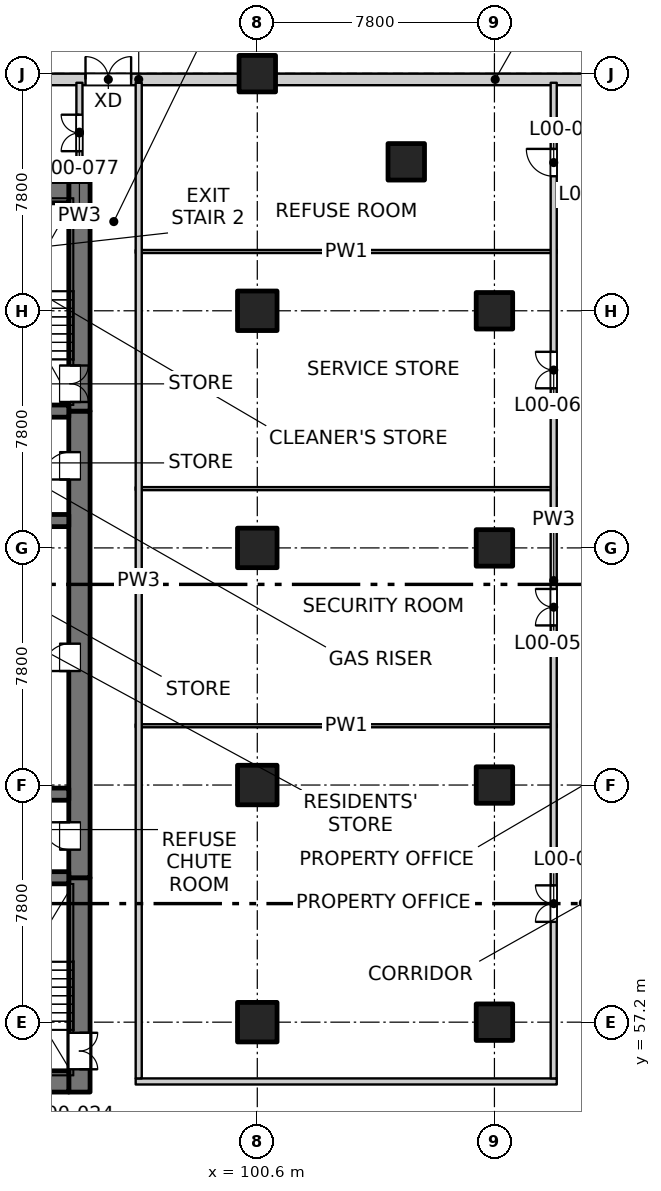
"""IFC4 building model, lengths in metres.
Left out: names, types, materials, properties, quantities, classifications, styles, units other than length and angle.
Written with IfcOpenShell. Run it as: python <this file> out.ifc"""

import sys

from ifc_helpers import new_model, si_unit, direction, frame, frame_2d, origin, origin_2d, place, context, subcontext, project, spatial, rectangle, extrude, element, fill, save


model = new_model("IFC4")
c1 = context("Model", 3, precision=1e-05, world=origin(), true_north=direction((0.0, 1.0)))
c2 = subcontext(c1, "Body", "Model", "MODEL_VIEW")
j1 = project(units=[si_unit("LENGTHUNIT", "METRE"), si_unit("PLANEANGLEUNIT", "RADIAN")], contexts=[c1])
p1 = place(None, origin())
s1 = spatial("IfcSite", under=j1, at=p1, CompositionType="ELEMENT")
p2 = place(p1, origin())
s2 = spatial("IfcBuilding", under=s1, at=p2, CompositionType="ELEMENT")
p3 = place(p2, origin())
s3 = spatial("IfcBuildingStorey", under=s2, at=p3, CompositionType="ELEMENT", Elevation=0.0)
for number, where, z_axis, x_axis in (
    (1, (105.5, 85.5, -0.4), (0.0, 0.0, 1.0), (1.0, 0.0, 0.0)),
    (2, (108.4, 57.2, -0.4), (0.0, 0.0, 1.0), (1.0, 0.0, 0.0)),
    (3, (108.4, 65.0, -0.4), (0.0, 0.0, 1.0), (1.0, 0.0, 0.0)),
    (4, (108.4, 72.8, -0.4), (0.0, 0.0, 1.0), (1.0, 0.0, 0.0)),
    (5, (108.4, 80.6, -0.4), (0.0, 0.0, 1.0), (1.0, 0.0, 0.0)),
    (6, (100.6, 88.4, -0.4), (0.0, 0.0, 1.0), (1.0, 0.0, 0.0)),
):
    element("IfcColumn", number, at=place(p3, frame(where, z_axis=z_axis, x_axis=x_axis)), inside=s3, PredefinedType="COLUMN", context=c2, shape_type="SweptSolid", body=[
        extrude(rectangle(XDim=1.2, YDim=1.2, at=origin_2d()), origin(), (0.0, 0.0, 1.0), 6.1),
    ])
for number, where, z_axis, x_axis in (
    (7, (100.6, 57.2, -0.4), (0.0, 0.0, 1.0), (1.0, 0.0, 0.0)),
    (8, (100.6, 65.0, -0.4), (0.0, 0.0, 1.0), (1.0, 0.0, 0.0)),
    (9, (100.6, 72.8, -0.4), (0.0, 0.0, 1.0), (1.0, 0.0, 0.0)),
    (10, (100.6, 80.6, -0.4), (0.0, 0.0, 1.0), (1.0, 0.0, 0.0)),
):
    element("IfcColumn", number, at=place(p3, frame(where, z_axis=z_axis, x_axis=x_axis)), inside=s3, PredefinedType="COLUMN", context=c2, shape_type="SweptSolid", body=[
        extrude(rectangle(XDim=1.3, YDim=1.3, at=origin_2d()), origin(), (0.0, 0.0, 1.0), 6.1),
    ])
p4 = place(p3, frame((94.75, 54.9, -0.4), z_axis=(0.0, 0.0, 1.0), x_axis=(0.0, 1.0, 0.0)))
e11 = element("IfcWall", 11, at=p4, inside=s3, PredefinedType="SOLIDWALL", context=c2, shape_type="SweptSolid", body=[
    extrude(rectangle(XDim=7.05, YDim=0.7, at=frame_2d((3.525, 0.0))), origin(), (0.0, 0.0, 1.0), 6.1),
])
p5 = place(p4, frame((0.75, 0.0, 0.4)))
e12 = element("IfcOpeningElement", 12, at=p5, cuts=e11, PredefinedType="OPENING", context=c2, shape_type="SweptSolid", body=[
    extrude(rectangle(XDim=1.2, YDim=2.1, at=frame_2d((0.6, 1.05))), frame((0.0, 0.36, 0.0), z_axis=(0.0, -1.0, 0.0), x_axis=(1.0, 0.0, 0.0)), (0.0, 0.0, 1.0), 0.72),
])
p6 = place(p3, frame((94.75, 61.95, -0.4), z_axis=(0.0, 0.0, 1.0), x_axis=(0.0, 1.0, 0.0)))
e13 = element("IfcWall", 13, at=p6, inside=s3, PredefinedType="SOLIDWALL", context=c2, shape_type="SweptSolid", body=[
    extrude(rectangle(XDim=15.35, YDim=0.7, at=frame_2d((7.675, 0.0))), origin(), (0.0, 0.0, 1.0), 6.1),
])
p7 = place(p6, frame((0.925, 0.0, 0.4)))
e14 = element("IfcOpeningElement", 14, at=p7, cuts=e13, PredefinedType="OPENING", context=c2, shape_type="SweptSolid", body=[
    extrude(rectangle(XDim=0.9, YDim=2.1, at=frame_2d((0.45, 1.05))), frame((0.0, 0.36, 0.0), z_axis=(0.0, -1.0, 0.0), x_axis=(1.0, 0.0, 0.0)), (0.0, 0.0, 1.0), 0.72),
])
p8 = place(p6, frame((6.8, 0.0, 0.4)))
e15 = element("IfcOpeningElement", 15, at=p8, cuts=e13, PredefinedType="OPENING", context=c2, shape_type="SweptSolid", body=[
    extrude(rectangle(XDim=0.9, YDim=2.1, at=frame_2d((0.45, 1.05))), frame((0.0, 0.36, 0.0), z_axis=(0.0, -1.0, 0.0), x_axis=(1.0, 0.0, 0.0)), (0.0, 0.0, 1.0), 0.72),
])
p9 = place(p6, frame((13.1, 0.0, 0.4)))
e16 = element("IfcOpeningElement", 16, at=p9, cuts=e13, PredefinedType="OPENING", context=c2, shape_type="SweptSolid", body=[
    extrude(rectangle(XDim=0.9, YDim=2.1, at=frame_2d((0.45, 1.05))), frame((0.0, 0.36, 0.0), z_axis=(0.0, -1.0, 0.0), x_axis=(1.0, 0.0, 0.0)), (0.0, 0.0, 1.0), 0.72),
])
p10 = place(p3, frame((94.75, 77.3, -0.4), z_axis=(0.0, 0.0, 1.0), x_axis=(0.0, 1.0, 0.0)))
e17 = element("IfcWall", 17, at=p10, inside=s3, PredefinedType="SOLIDWALL", context=c2, shape_type="SweptSolid", body=[
    extrude(rectangle(XDim=7.55, YDim=0.7, at=frame_2d((3.775, 0.0))), origin(), (0.0, 0.0, 1.0), 6.1),
])
p11 = place(p10, frame((0.3, 0.0, 0.4)))
e18 = element("IfcOpeningElement", 18, at=p11, cuts=e17, PredefinedType="OPENING", context=c2, shape_type="SweptSolid", body=[
    extrude(rectangle(XDim=1.2, YDim=2.1, at=frame_2d((0.6, 1.05))), frame((0.0, 0.36, 0.0), z_axis=(0.0, -1.0, 0.0), x_axis=(1.0, 0.0, 0.0)), (0.0, 0.0, 1.0), 0.72),
])
p12 = place(p3, frame((75.6, 55.25, -0.4), z_axis=(0.0, 0.0, 1.0), x_axis=(1.0, 0.0, 0.0)))
e19 = element("IfcWall", 19, at=p12, inside=s3, PredefinedType="SOLIDWALL", context=c2, shape_type="SweptSolid", body=[
    extrude(rectangle(XDim=18.8, YDim=0.7, at=frame_2d((9.4, 0.0))), origin(), (0.0, 0.0, 1.0), 6.1),
])
p13 = place(p12, frame((8.65, 0.0, 0.4)))
e20 = element("IfcOpeningElement", 20, at=p13, cuts=e19, PredefinedType="OPENING", context=c2, shape_type="SweptSolid", body=[
    extrude(rectangle(XDim=1.5, YDim=2.1, at=frame_2d((0.75, 1.05))), frame((0.0, 0.36, 0.0), z_axis=(0.0, -1.0, 0.0), x_axis=(1.0, 0.0, 0.0)), (0.0, 0.0, 1.0), 0.72),
])
p14 = place(p3, frame((75.6, 84.5, -0.4), z_axis=(0.0, 0.0, 1.0), x_axis=(1.0, 0.0, 0.0)))
e21 = element("IfcWall", 21, at=p14, inside=s3, PredefinedType="SOLIDWALL", context=c2, shape_type="SweptSolid", body=[
    extrude(rectangle(XDim=18.8, YDim=0.7, at=frame_2d((9.4, 0.0))), origin(), (0.0, 0.0, 1.0), 6.1),
])
for number, where, z_axis, x_axis in (
    (22, (90.75, 61.95, -0.4), (0.0, 0.0, 1.0), (1.0, 0.0, 0.0)),
    (23, (90.75, 64.7, -0.4), (0.0, 0.0, 1.0), (1.0, 0.0, 0.0)),
    (24, (90.75, 73.7, -0.4), (0.0, 0.0, 1.0), (1.0, 0.0, 0.0)),
    (25, (90.75, 77.3, -0.4), (0.0, 0.0, 1.0), (1.0, 0.0, 0.0)),
):
    element("IfcWall", number, at=place(p3, frame(where, z_axis=z_axis, x_axis=x_axis)), inside=s3, PredefinedType="SOLIDWALL", context=c2, shape_type="SweptSolid", body=[
        extrude(rectangle(XDim=3.65, YDim=0.4, at=frame_2d((1.825, 0.0))), origin(), (0.0, 0.0, 1.0), 6.1),
    ])
p15 = place(p3, frame((93.4, 88.21, 0.0), z_axis=(0.0, 0.0, 1.0), x_axis=(1.0, 0.0, 0.0)))
e26 = element("IfcWall", 26, at=p15, inside=s3, PredefinedType="SOLIDWALL", context=c2, shape_type="SweptSolid", body=[
    extrude(rectangle(XDim=6.6, YDim=0.38, at=frame_2d((3.3, 0.0))), origin(), (0.0, 0.0, 1.0), 5.7),
])
p16 = place(p15, frame((1.55, 0.0, 0.0)))
e27 = element("IfcOpeningElement", 27, at=p16, cuts=e26, PredefinedType="OPENING", context=c2, shape_type="SweptSolid", body=[
    extrude(rectangle(XDim=1.5, YDim=2.4, at=frame_2d((0.75, 1.2))), frame((0.0, 0.2, 0.0), z_axis=(0.0, -1.0, 0.0), x_axis=(1.0, 0.0, 0.0)), (0.0, 0.0, 1.0), 0.4),
])
p17 = place(p3, frame((101.2, 88.21, 0.0), z_axis=(0.0, 0.0, 1.0), x_axis=(1.0, 0.0, 0.0)))
e28 = element("IfcWall", 28, at=p17, inside=s3, PredefinedType="SOLIDWALL", context=c2, shape_type="SweptSolid", body=[
    extrude(rectangle(XDim=14.45, YDim=0.38, at=frame_2d((7.225, 0.0))), origin(), (0.0, 0.0, 1.0), 5.7),
])
p18 = place(p3, frame((96.6, 55.25, 0.0), z_axis=(0.0, 0.0, 1.0), x_axis=(1.0, 0.0, 0.0)))
e29 = element("IfcWall", 29, at=p18, inside=s3, PredefinedType="PARTITIONING", context=c2, shape_type="SweptSolid", body=[
    extrude(rectangle(XDim=13.85, YDim=0.2, at=frame_2d((6.925, 0.0))), origin(), (0.0, 0.0, 1.0), 5.7),
])
for number, where, z_axis, x_axis in (
    (30, (96.6, 66.95, 0.0), (0.0, 0.0, 1.0), (1.0, 0.0, 0.0)),
    (31, (96.6, 74.75, 0.0), (0.0, 0.0, 1.0), (1.0, 0.0, 0.0)),
    (32, (96.6, 82.55, 0.0), (0.0, 0.0, 1.0), (1.0, 0.0, 0.0)),
):
    element("IfcWall", number, at=place(p3, frame(where, z_axis=z_axis, x_axis=x_axis)), inside=s3, PredefinedType="PARTITIONING", context=c2, shape_type="SweptSolid", body=[
        extrude(rectangle(XDim=13.85, YDim=0.1, at=frame_2d((6.925, 0.0))), origin(), (0.0, 0.0, 1.0), 5.7),
    ])
p19 = place(p3, frame((94.75, 84.85, 0.0), z_axis=(0.0, 0.0, 1.0), x_axis=(0.0, 1.0, 0.0)))
e33 = element("IfcWall", 33, at=p19, inside=s3, PredefinedType="PARTITIONING", context=c2, shape_type="SweptSolid", body=[
    extrude(rectangle(XDim=3.25, YDim=0.2, at=frame_2d((1.625, 0.0))), origin(), (0.0, 0.0, 1.0), 5.7),
])
p20 = place(p19, frame((1.0, 0.0, 0.0)))
e34 = element("IfcOpeningElement", 34, at=p20, cuts=e33, PredefinedType="OPENING", context=c2, shape_type="SweptSolid", body=[
    extrude(rectangle(XDim=1.2, YDim=2.1, at=frame_2d((0.6, 1.05))), frame((0.0, 0.11, 0.0), z_axis=(0.0, -1.0, 0.0), x_axis=(1.0, 0.0, 0.0)), (0.0, 0.0, 1.0), 0.22),
])
p21 = place(p3, frame((96.7, 55.35, 0.0), z_axis=(0.0, 0.0, 1.0), x_axis=(0.0, 1.0, 0.0)))
e35 = element("IfcWall", 35, at=p21, inside=s3, PredefinedType="PARTITIONING", context=c2, shape_type="SweptSolid", body=[
    extrude(rectangle(XDim=32.75, YDim=0.2, at=frame_2d((16.375, 0.0))), origin(), (0.0, 0.0, 1.0), 5.7),
])
p22 = place(p3, frame((110.35, 55.35, 0.0), z_axis=(0.0, 0.0, 1.0), x_axis=(0.0, 1.0, 0.0)))
e36 = element("IfcWall", 36, at=p22, inside=s3, PredefinedType="PARTITIONING", context=c2, shape_type="SweptSolid", body=[
    extrude(rectangle(XDim=32.75, YDim=0.2, at=frame_2d((16.375, 0.0))), origin(), (0.0, 0.0, 1.0), 5.7),
])
p23 = place(p22, frame((5.15, 0.0, 0.0)))
e37 = element("IfcOpeningElement", 37, at=p23, cuts=e36, PredefinedType="OPENING", context=c2, shape_type="SweptSolid", body=[
    extrude(rectangle(XDim=1.2, YDim=2.1, at=frame_2d((0.6, 1.05))), frame((0.0, 0.11, 0.0), z_axis=(0.0, -1.0, 0.0), x_axis=(1.0, 0.0, 0.0)), (0.0, 0.0, 1.0), 0.22),
])
p24 = place(p22, frame((14.9, 0.0, 0.0)))
e38 = element("IfcOpeningElement", 38, at=p24, cuts=e36, PredefinedType="OPENING", context=c2, shape_type="SweptSolid", body=[
    extrude(rectangle(XDim=1.2, YDim=2.1, at=frame_2d((0.6, 1.05))), frame((0.0, 0.11, 0.0), z_axis=(0.0, -1.0, 0.0), x_axis=(1.0, 0.0, 0.0)), (0.0, 0.0, 1.0), 0.22),
])
p25 = place(p22, frame((22.7, 0.0, 0.0)))
e39 = element("IfcOpeningElement", 39, at=p25, cuts=e36, PredefinedType="OPENING", context=c2, shape_type="SweptSolid", body=[
    extrude(rectangle(XDim=1.2, YDim=2.1, at=frame_2d((0.6, 1.05))), frame((0.0, 0.11, 0.0), z_axis=(0.0, -1.0, 0.0), x_axis=(1.0, 0.0, 0.0)), (0.0, 0.0, 1.0), 0.22),
])
p26 = place(p22, frame((29.675, 0.0, 0.0)))
e40 = element("IfcOpeningElement", 40, at=p26, cuts=e36, PredefinedType="OPENING", context=c2, shape_type="SweptSolid", body=[
    extrude(rectangle(XDim=0.9, YDim=2.1, at=frame_2d((0.45, 1.05))), frame((0.0, 0.11, 0.0), z_axis=(0.0, -1.0, 0.0), x_axis=(1.0, 0.0, 0.0)), (0.0, 0.0, 1.0), 0.22),
])
p27 = place(p16, origin())
e41 = element("IfcDoor", 41, at=p27, inside=s3, OperationType="DOUBLE_DOOR_SINGLE_SWING", PredefinedType="DOOR", context=c2, shape_type="SweptSolid", body=[
    extrude(rectangle(XDim=1.5, YDim=2.4, at=frame_2d((0.75, 1.2))), frame((0.0, 0.025, 0.0), z_axis=(0.0, -1.0, 0.0), x_axis=(1.0, 0.0, 0.0)), (0.0, 0.0, 1.0), 0.05),
])
fill(e27, e41)
p28 = place(p5, frame((1.2, 0.0, 0.0), z_axis=(0.0, 0.0, 1.0), x_axis=(-1.0, 0.0, 0.0)))
e42 = element("IfcDoor", 42, at=p28, inside=s3, OperationType="DOUBLE_DOOR_SINGLE_SWING", PredefinedType="DOOR", context=c2, shape_type="SweptSolid", body=[
    extrude(rectangle(XDim=1.2, YDim=2.1, at=frame_2d((0.6, 1.05))), frame((0.0, 0.025, 0.0), z_axis=(0.0, -1.0, 0.0), x_axis=(1.0, 0.0, 0.0)), (0.0, 0.0, 1.0), 0.05),
])
fill(e12, e42)
p29 = place(p23, origin())
e43 = element("IfcDoor", 43, at=p29, inside=s3, OperationType="DOUBLE_DOOR_SINGLE_SWING", PredefinedType="DOOR", context=c2, shape_type="SweptSolid", body=[
    extrude(rectangle(XDim=1.2, YDim=2.1, at=frame_2d((0.6, 1.05))), frame((0.0, 0.025, 0.0), z_axis=(0.0, -1.0, 0.0), x_axis=(1.0, 0.0, 0.0)), (0.0, 0.0, 1.0), 0.05),
])
fill(e37, e43)
p30 = place(p7, origin())
e44 = element("IfcDoor", 44, at=p30, inside=s3, OperationType="SINGLE_SWING_RIGHT", PredefinedType="DOOR", context=c2, shape_type="SweptSolid", body=[
    extrude(rectangle(XDim=0.9, YDim=2.1, at=frame_2d((0.45, 1.05))), frame((0.0, 0.335, 0.0), z_axis=(0.0, -1.0, 0.0), x_axis=(1.0, 0.0, 0.0)), (0.0, 0.0, 1.0), 0.05),
])
fill(e14, e44)
p31 = place(p8, origin())
e45 = element("IfcDoor", 45, at=p31, inside=s3, OperationType="SINGLE_SWING_LEFT", PredefinedType="DOOR", context=c2, shape_type="SweptSolid", body=[
    extrude(rectangle(XDim=0.9, YDim=2.1, at=frame_2d((0.45, 1.05))), frame((0.0, 0.335, 0.0), z_axis=(0.0, -1.0, 0.0), x_axis=(1.0, 0.0, 0.0)), (0.0, 0.0, 1.0), 0.05),
])
fill(e15, e45)
p32 = place(p24, origin())
e46 = element("IfcDoor", 46, at=p32, inside=s3, OperationType="DOUBLE_DOOR_SINGLE_SWING", PredefinedType="DOOR", context=c2, shape_type="SweptSolid", body=[
    extrude(rectangle(XDim=1.2, YDim=2.1, at=frame_2d((0.6, 1.05))), frame((0.0, 0.025, 0.0), z_axis=(0.0, -1.0, 0.0), x_axis=(1.0, 0.0, 0.0)), (0.0, 0.0, 1.0), 0.05),
])
fill(e38, e46)
p33 = place(p9, origin())
e47 = element("IfcDoor", 47, at=p33, inside=s3, OperationType="SINGLE_SWING_LEFT", PredefinedType="DOOR", context=c2, shape_type="SweptSolid", body=[
    extrude(rectangle(XDim=0.9, YDim=2.1, at=frame_2d((0.45, 1.05))), frame((0.0, 0.335, 0.0), z_axis=(0.0, -1.0, 0.0), x_axis=(1.0, 0.0, 0.0)), (0.0, 0.0, 1.0), 0.05),
])
fill(e16, e47)
p34 = place(p11, frame((1.2, 0.0, 0.0), z_axis=(0.0, 0.0, 1.0), x_axis=(-1.0, 0.0, 0.0)))
e48 = element("IfcDoor", 48, at=p34, inside=s3, OperationType="DOUBLE_DOOR_SINGLE_SWING", PredefinedType="DOOR", context=c2, shape_type="SweptSolid", body=[
    extrude(rectangle(XDim=1.2, YDim=2.1, at=frame_2d((0.6, 1.05))), frame((0.0, -0.285, 0.0), z_axis=(0.0, -1.0, 0.0), x_axis=(1.0, 0.0, 0.0)), (0.0, 0.0, 1.0), 0.05),
])
fill(e18, e48)
p35 = place(p25, origin())
e49 = element("IfcDoor", 49, at=p35, inside=s3, OperationType="DOUBLE_DOOR_SINGLE_SWING", PredefinedType="DOOR", context=c2, shape_type="SweptSolid", body=[
    extrude(rectangle(XDim=1.2, YDim=2.1, at=frame_2d((0.6, 1.05))), frame((0.0, 0.025, 0.0), z_axis=(0.0, -1.0, 0.0), x_axis=(1.0, 0.0, 0.0)), (0.0, 0.0, 1.0), 0.05),
])
fill(e39, e49)
p36 = place(p26, origin())
e50 = element("IfcDoor", 50, at=p36, inside=s3, OperationType="SINGLE_SWING_RIGHT", PredefinedType="DOOR", context=c2, shape_type="SweptSolid", body=[
    extrude(rectangle(XDim=0.9, YDim=2.1, at=frame_2d((0.45, 1.05))), frame((0.0, 0.025, 0.0), z_axis=(0.0, -1.0, 0.0), x_axis=(1.0, 0.0, 0.0)), (0.0, 0.0, 1.0), 0.05),
])
fill(e40, e50)
p37 = place(p20, origin())
e51 = element("IfcDoor", 51, at=p37, inside=s3, OperationType="DOUBLE_DOOR_SINGLE_SWING", PredefinedType="DOOR", context=c2, shape_type="SweptSolid", body=[
    extrude(rectangle(XDim=1.2, YDim=2.1, at=frame_2d((0.6, 1.05))), frame((0.0, 0.025, 0.0), z_axis=(0.0, -1.0, 0.0), x_axis=(1.0, 0.0, 0.0)), (0.0, 0.0, 1.0), 0.05),
])
fill(e34, e51)
save(model, sys.argv[1])
